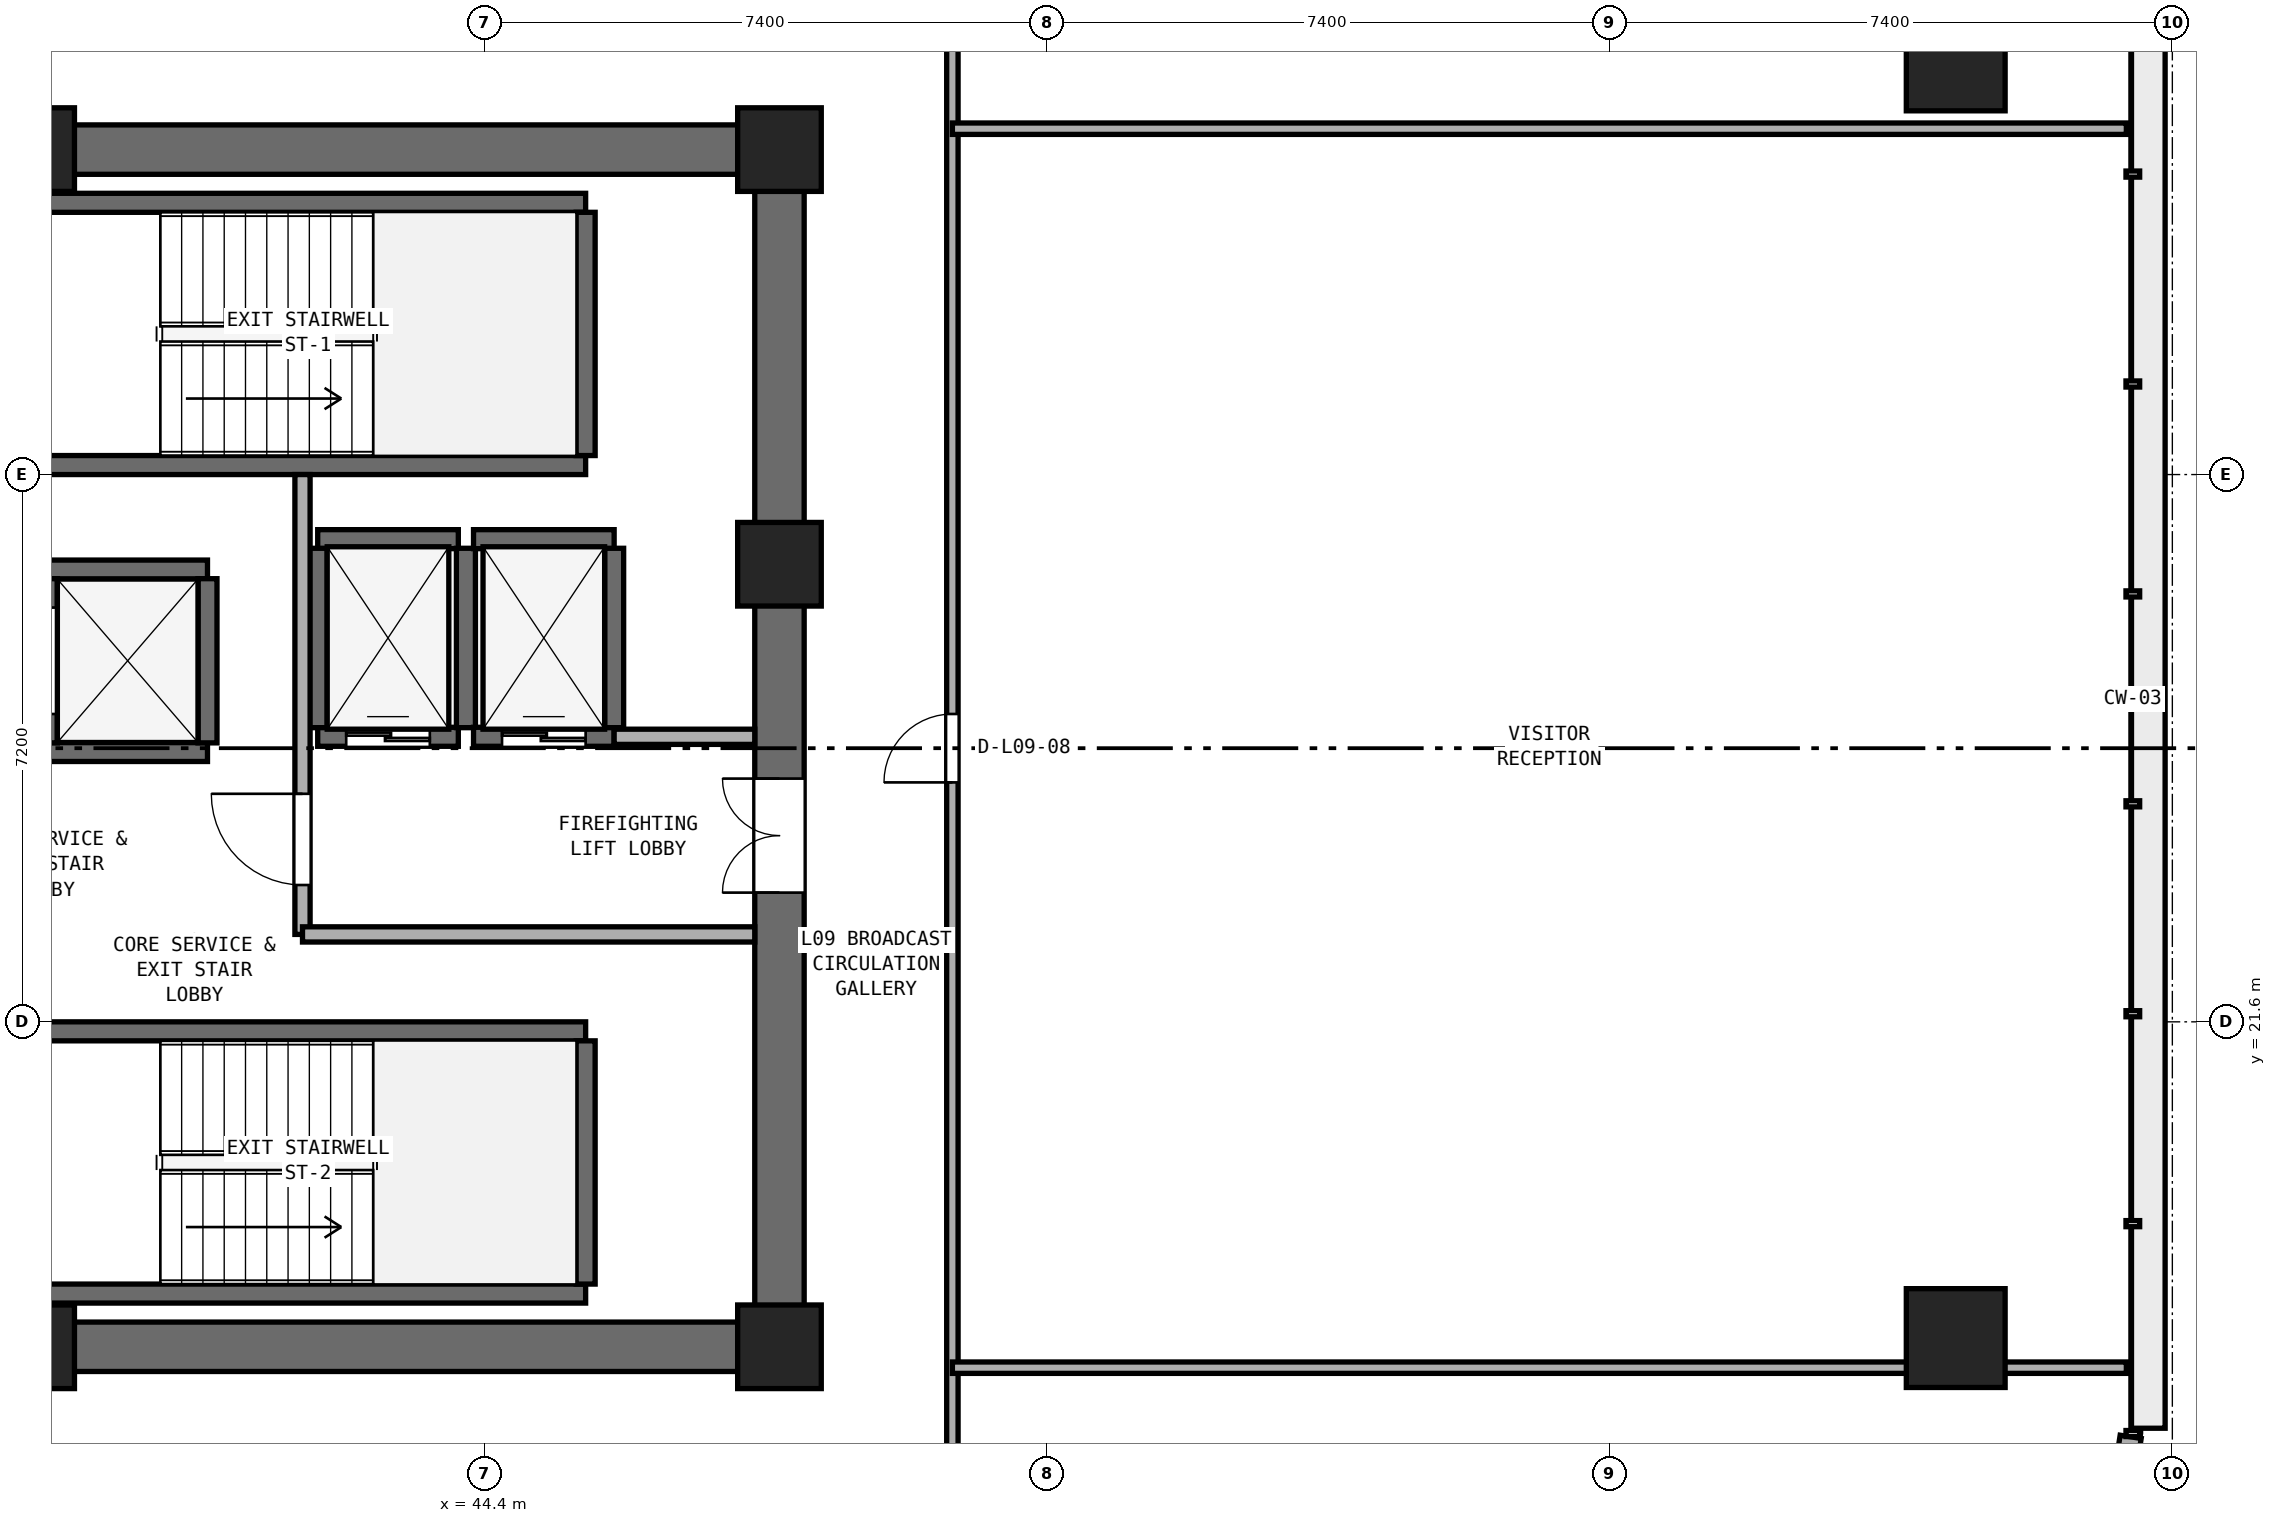
"""IFC4 building model, lengths in metres.
Left out: names, types, materials, properties, quantities, classifications, styles, units other than length and angle.
Written with IfcOpenShell. Run it as: python <this file> out.ifc"""

import sys

from ifc_helpers import new_model, si_unit, direction, frame, frame_2d, origin, origin_2d, place, context, subcontext, project, spatial, rectangle, extrude, element, fill, save


model = new_model("IFC4")
c1 = context("Model", 3, precision=1e-05, world=origin(), true_north=direction((0.0, 1.0)))
c2 = subcontext(c1, "Body", "Model", "MODEL_VIEW")
j1 = project(units=[si_unit("LENGTHUNIT", "METRE"), si_unit("PLANEANGLEUNIT", "RADIAN")], contexts=[c1])
p1 = place(None, origin())
s1 = spatial("IfcSite", under=j1, at=p1, CompositionType="ELEMENT")
p2 = place(p1, origin())
s2 = spatial("IfcBuilding", under=s1, at=p2, CompositionType="ELEMENT")
p3 = place(p2, frame((0.0, 0.0, 40.2)))
s3 = spatial("IfcBuildingStorey", under=s2, at=p3, CompositionType="ELEMENT", Elevation=40.2)
for number, where, z_axis, x_axis in (
    (1, (25.4, 17.325, 0.0), (0.0, 0.0, 1.0), (1.0, 0.0, 0.0)),
    (2, (25.4, 33.075, 0.0), (0.0, 0.0, 1.0), (1.0, 0.0, 0.0)),
):
    element("IfcWall", number, at=place(p3, frame(where, z_axis=z_axis, x_axis=x_axis)), inside=s3, PredefinedType="SHEAR", context=c2, shape_type="SweptSolid", body=[
        extrude(rectangle(XDim=23.2, YDim=0.65, at=frame_2d((11.6, 0.0))), origin(), (0.0, 0.0, 1.0), 3.525),
    ])
p4 = place(p3, frame((48.275, 17.65, 0.0), z_axis=(0.0, 0.0, 1.0), x_axis=(0.0, 1.0, 0.0)))
e3 = element("IfcWall", 3, at=p4, inside=s3, PredefinedType="SHEAR", context=c2, shape_type="SweptSolid", body=[
    extrude(rectangle(XDim=15.1, YDim=0.65, at=frame_2d((7.55, 0.0))), origin(), (0.0, 0.0, 1.0), 3.525),
])
p5 = place(p4, frame((5.65, 0.0, 0.0)))
e4 = element("IfcOpeningElement", 4, at=p5, cuts=e3, PredefinedType="OPENING", context=c2, shape_type="SweptSolid", body=[
    extrude(rectangle(XDim=1.5, YDim=2.15, at=frame_2d((0.75, 1.075))), frame((0.0, 0.335, 0.0), z_axis=(0.0, -1.0, 0.0), x_axis=(1.0, 0.0, 0.0)), (0.0, 0.0, 1.0), 0.67),
])
for number, where, z_axis, x_axis in (
    (5, (38.45, 17.325, 0.0), (0.0, 0.0, 1.0), (1.0, 0.0, 0.0)),
    (6, (48.275, 17.325, 0.0), (0.0, 0.0, 1.0), (1.0, 0.0, 0.0)),
    (7, (48.275, 27.62, 0.0), (0.0, 0.0, 1.0), (1.0, 0.0, 0.0)),
    (8, (48.275, 33.075, 0.0), (0.0, 0.0, 1.0), (1.0, 0.0, 0.0)),
    (9, (38.45, 33.075, 0.0), (0.0, 0.0, 1.0), (1.0, 0.0, 0.0)),
):
    element("IfcColumn", number, at=place(p3, frame(where, z_axis=z_axis, x_axis=x_axis)), inside=s3, PredefinedType="PILASTER", context=c2, shape_type="SweptSolid", body=[
        extrude(rectangle(XDim=1.1, YDim=1.1, at=origin_2d()), origin(), (0.0, 0.0, 1.0), 3.8),
    ])
for number, where, z_axis, x_axis in (
    (10, (63.75, 17.44, 0.0), (0.0, 0.0, 1.0), (1.0, 0.0, 0.0)),
    (11, (63.75, 34.235, 0.0), (0.0, 0.0, 1.0), (1.0, 0.0, 0.0)),
):
    element("IfcColumn", number, at=place(p3, frame(where, z_axis=z_axis, x_axis=x_axis)), inside=s3, PredefinedType="COLUMN", context=c2, shape_type="SweptSolid", body=[
        extrude(rectangle(XDim=1.3, YDim=1.3, at=origin_2d()), origin(), (0.0, 0.0, 1.0), 3.8),
    ])
for number, where, z_axis, x_axis in (
    (12, (38.425, 28.925, 0.0), (0.0, 0.0, 1.0), (1.0, 0.0, 0.0)),
    (13, (38.425, 32.375, 0.0), (0.0, 0.0, 1.0), (1.0, 0.0, 0.0)),
):
    element("IfcWall", number, at=place(p3, frame(where, z_axis=z_axis, x_axis=x_axis)), inside=s3, PredefinedType="SHEAR", context=c2, shape_type="SweptSolid", body=[
        extrude(rectangle(XDim=7.3, YDim=0.25, at=frame_2d((3.65, 0.0))), origin(), (0.0, 0.0, 1.0), 3.525),
    ])
p6 = place(p3, frame((45.725, 29.05, 0.0), z_axis=(0.0, 0.0, 1.0), x_axis=(0.0, 1.0, 0.0)))
e14 = element("IfcWall", 14, at=p6, inside=s3, PredefinedType="SHEAR", context=c2, shape_type="SweptSolid", body=[
    extrude(rectangle(XDim=3.2, YDim=0.25, at=frame_2d((1.6, 0.0))), origin(), (0.0, 0.0, 1.0), 3.525),
])
for number, where, z_axis, x_axis in (
    (15, (38.425, 18.025, 0.0), (0.0, 0.0, 1.0), (1.0, 0.0, 0.0)),
    (16, (38.425, 21.475, 0.0), (0.0, 0.0, 1.0), (1.0, 0.0, 0.0)),
):
    element("IfcWall", number, at=place(p3, frame(where, z_axis=z_axis, x_axis=x_axis)), inside=s3, PredefinedType="SHEAR", context=c2, shape_type="SweptSolid", body=[
        extrude(rectangle(XDim=7.3, YDim=0.25, at=frame_2d((3.65, 0.0))), origin(), (0.0, 0.0, 1.0), 3.525),
    ])
p7 = place(p3, frame((45.725, 18.15, 0.0), z_axis=(0.0, 0.0, 1.0), x_axis=(0.0, 1.0, 0.0)))
e17 = element("IfcWall", 17, at=p7, inside=s3, PredefinedType="SHEAR", context=c2, shape_type="SweptSolid", body=[
    extrude(rectangle(XDim=3.2, YDim=0.25, at=frame_2d((1.6, 0.0))), origin(), (0.0, 0.0, 1.0), 3.525),
])
p8 = place(p3, frame((42.2, 25.35, 0.0), z_axis=(0.0, 0.0, 1.0), x_axis=(1.0, 0.0, 0.0)))
e18 = element("IfcWall", 18, at=p8, inside=s3, PredefinedType="SHEAR", context=c2, shape_type="SweptSolid", body=[
    extrude(rectangle(XDim=1.85, YDim=0.25, at=frame_2d((0.925, 0.0))), origin(), (0.0, 0.0, 1.0), 3.525),
])
p9 = place(p8, frame((0.375, 0.0, 0.0)))
e19 = element("IfcOpeningElement", 19, at=p9, cuts=e18, PredefinedType="OPENING", context=c2, shape_type="SweptSolid", body=[
    extrude(rectangle(XDim=1.1, YDim=2.15, at=frame_2d((0.55, 1.075))), frame((0.0, 0.135, 0.0), z_axis=(0.0, -1.0, 0.0), x_axis=(1.0, 0.0, 0.0)), (0.0, 0.0, 1.0), 0.27),
])
p10 = place(p3, frame((42.2, 27.95, 0.0), z_axis=(0.0, 0.0, 1.0), x_axis=(1.0, 0.0, 0.0)))
e20 = element("IfcWall", 20, at=p10, inside=s3, PredefinedType="SHEAR", context=c2, shape_type="SweptSolid", body=[
    extrude(rectangle(XDim=1.85, YDim=0.25, at=frame_2d((0.925, 0.0))), origin(), (0.0, 0.0, 1.0), 3.525),
])
for number, where, z_axis, x_axis in (
    (21, (42.2, 25.47, 0.0), (0.0, 0.0, 1.0), (0.0, 1.0, 0.0)),
    (22, (44.15, 25.47, 0.0), (0.0, 0.0, 1.0), (0.0, 1.0, 0.0)),
):
    element("IfcWall", number, at=place(p3, frame(where, z_axis=z_axis, x_axis=x_axis)), inside=s3, PredefinedType="SHEAR", context=c2, shape_type="SweptSolid", body=[
        extrude(rectangle(XDim=2.36, YDim=0.25, at=frame_2d((1.18, 0.0))), origin(), (0.0, 0.0, 1.0), 3.525),
    ])
p11 = place(p3, frame((44.25, 25.35, 0.0), z_axis=(0.0, 0.0, 1.0), x_axis=(1.0, 0.0, 0.0)))
e23 = element("IfcWall", 23, at=p11, inside=s3, PredefinedType="SHEAR", context=c2, shape_type="SweptSolid", body=[
    extrude(rectangle(XDim=1.85, YDim=0.25, at=frame_2d((0.925, 0.0))), origin(), (0.0, 0.0, 1.0), 3.525),
])
p12 = place(p11, frame((0.375, 0.0, 0.0)))
e24 = element("IfcOpeningElement", 24, at=p12, cuts=e23, PredefinedType="OPENING", context=c2, shape_type="SweptSolid", body=[
    extrude(rectangle(XDim=1.1, YDim=2.15, at=frame_2d((0.55, 1.075))), frame((0.0, 0.135, 0.0), z_axis=(0.0, -1.0, 0.0), x_axis=(1.0, 0.0, 0.0)), (0.0, 0.0, 1.0), 0.27),
])
p13 = place(p3, frame((44.25, 27.95, 0.0), z_axis=(0.0, 0.0, 1.0), x_axis=(1.0, 0.0, 0.0)))
e25 = element("IfcWall", 25, at=p13, inside=s3, PredefinedType="SHEAR", context=c2, shape_type="SweptSolid", body=[
    extrude(rectangle(XDim=1.85, YDim=0.25, at=frame_2d((0.925, 0.0))), origin(), (0.0, 0.0, 1.0), 3.525),
])
p14 = place(p3, frame((46.1, 25.47, 0.0), z_axis=(0.0, 0.0, 1.0), x_axis=(0.0, 1.0, 0.0)))
e26 = element("IfcWall", 26, at=p14, inside=s3, PredefinedType="SHEAR", context=c2, shape_type="SweptSolid", body=[
    extrude(rectangle(XDim=2.36, YDim=0.25, at=frame_2d((1.18, 0.0))), origin(), (0.0, 0.0, 1.0), 3.525),
])
for number, where, z_axis, x_axis in (
    (27, (38.65, 25.15, 0.0), (0.0, 0.0, 1.0), (1.0, 0.0, 0.0)),
    (28, (38.65, 27.55, 0.0), (0.0, 0.0, 1.0), (1.0, 0.0, 0.0)),
):
    element("IfcWall", number, at=place(p3, frame(where, z_axis=z_axis, x_axis=x_axis)), inside=s3, PredefinedType="SHEAR", context=c2, shape_type="SweptSolid", body=[
        extrude(rectangle(XDim=2.1, YDim=0.25, at=frame_2d((1.05, 0.0))), origin(), (0.0, 0.0, 1.0), 3.525),
    ])
p15 = place(p3, frame((38.65, 25.27, 0.0), z_axis=(0.0, 0.0, 1.0), x_axis=(0.0, 1.0, 0.0)))
e29 = element("IfcWall", 29, at=p15, inside=s3, PredefinedType="SHEAR", context=c2, shape_type="SweptSolid", body=[
    extrude(rectangle(XDim=2.16, YDim=0.25, at=frame_2d((1.08, 0.0))), origin(), (0.0, 0.0, 1.0), 3.525),
])
p16 = place(p15, frame((0.38, 0.0, 0.0)))
e30 = element("IfcOpeningElement", 30, at=p16, cuts=e29, PredefinedType="OPENING", context=c2, shape_type="SweptSolid", body=[
    extrude(rectangle(XDim=1.4, YDim=2.2, at=frame_2d((0.7, 1.1))), frame((0.0, 0.135, 0.0), z_axis=(0.0, -1.0, 0.0), x_axis=(1.0, 0.0, 0.0)), (0.0, 0.0, 1.0), 0.27),
])
p17 = place(p3, frame((40.75, 25.27, 0.0), z_axis=(0.0, 0.0, 1.0), x_axis=(0.0, 1.0, 0.0)))
e31 = element("IfcWall", 31, at=p17, inside=s3, PredefinedType="SHEAR", context=c2, shape_type="SweptSolid", body=[
    extrude(rectangle(XDim=2.16, YDim=0.25, at=frame_2d((1.08, 0.0))), origin(), (0.0, 0.0, 1.0), 3.525),
])
p18 = place(p3, frame((42.0, 22.75, 0.0), z_axis=(0.0, 0.0, 1.0), x_axis=(0.0, 1.0, 0.0)))
e32 = element("IfcWall", 32, at=p18, inside=s3, PredefinedType="SOLIDWALL", context=c2, shape_type="SweptSolid", body=[
    extrude(rectangle(XDim=6.05, YDim=0.2, at=frame_2d((3.025, 0.0))), origin(), (0.0, 0.0, 1.0), 3.525),
])
p19 = place(p18, frame((0.65, 0.0, 0.0)))
e33 = element("IfcOpeningElement", 33, at=p19, cuts=e32, PredefinedType="OPENING", context=c2, shape_type="SweptSolid", body=[
    extrude(rectangle(XDim=1.2, YDim=2.15, at=frame_2d((0.6, 1.075))), frame((0.0, 0.11, 0.0), z_axis=(0.0, -1.0, 0.0), x_axis=(1.0, 0.0, 0.0)), (0.0, 0.0, 1.0), 0.22),
])
p20 = place(p3, frame((42.0, 22.75, 0.0), z_axis=(0.0, 0.0, 1.0), x_axis=(1.0, 0.0, 0.0)))
e34 = element("IfcWall", 34, at=p20, inside=s3, PredefinedType="SOLIDWALL", context=c2, shape_type="SweptSolid", body=[
    extrude(rectangle(XDim=5.95, YDim=0.2, at=frame_2d((2.975, 0.0))), origin(), (0.0, 0.0, 1.0), 3.525),
])
p21 = place(p3, frame((46.1, 25.35, 0.0), z_axis=(0.0, 0.0, 1.0), x_axis=(1.0, 0.0, 0.0)))
e35 = element("IfcWall", 35, at=p21, inside=s3, PredefinedType="SOLIDWALL", context=c2, shape_type="SweptSolid", body=[
    extrude(rectangle(XDim=1.85, YDim=0.2, at=frame_2d((0.925, 0.0))), origin(), (0.0, 0.0, 1.0), 3.525),
])
p22 = place(p3, frame((50.55, 15.05, 0.0), z_axis=(0.0, 0.0, 1.0), x_axis=(0.0, 1.0, 0.0)))
e36 = element("IfcWall", 36, at=p22, inside=s3, PredefinedType="PARTITIONING", context=c2, shape_type="SweptSolid", body=[
    extrude(rectangle(XDim=20.3, YDim=0.15, at=frame_2d((10.15, 0.0))), origin(), (0.0, 0.0, 1.0), 3.525),
])
p23 = place(p22, frame((9.7, 0.0, 0.0)))
e37 = element("IfcOpeningElement", 37, at=p23, cuts=e36, PredefinedType="OPENING", context=c2, shape_type="SweptSolid", body=[
    extrude(rectangle(XDim=0.9, YDim=2.1, at=frame_2d((0.45, 1.05))), frame((0.0, 0.085, 0.0), z_axis=(0.0, -1.0, 0.0), x_axis=(1.0, 0.0, 0.0)), (0.0, 0.0, 1.0), 0.17),
])
p24 = place(p3, frame((50.55, 17.05, 0.0), z_axis=(0.0, 0.0, 1.0), x_axis=(1.0, 0.0, 0.0)))
e38 = element("IfcWall", 38, at=p24, inside=s3, PredefinedType="PARTITIONING", context=c2, shape_type="SweptSolid", body=[
    extrude(rectangle(XDim=15.445, YDim=0.15, at=frame_2d((7.723, 0.0))), origin(), (0.0, 0.0, 1.0), 3.525),
])
p25 = place(p3, frame((50.55, 33.35, 0.0), z_axis=(0.0, 0.0, 1.0), x_axis=(1.0, 0.0, 0.0)))
e39 = element("IfcWall", 39, at=p25, inside=s3, PredefinedType="PARTITIONING", context=c2, shape_type="SweptSolid", body=[
    extrude(rectangle(XDim=15.445, YDim=0.15, at=frame_2d((7.723, 0.0))), origin(), (0.0, 0.0, 1.0), 2.908),
])
p26 = place(p3, frame((65.867, 14.943, 0.0), z_axis=(0.0, 0.0, 1.0), x_axis=(0.152102600021, 0.988364709541, 0.0)))
e40 = element("IfcWall", 40, at=p26, inside=s3, PredefinedType="STANDARD", context=c2, shape_type="SweptSolid", body=[
    extrude(rectangle(XDim=1.212, YDim=0.28, at=frame_2d((0.606, 0.0))), origin(), (0.0, 0.0, 1.0), 3.525),
])
p27 = place(p9, origin())
e41 = element("IfcDoor", 41, at=p27, inside=s3, OperationType="DOUBLE_DOOR_SLIDING", PredefinedType="DOOR", context=c2, shape_type="SweptSolid", body=[
    extrude(rectangle(XDim=1.1, YDim=2.15, at=frame_2d((0.55, 1.075))), frame((0.0, 0.025, 0.0), z_axis=(0.0, -1.0, 0.0), x_axis=(1.0, 0.0, 0.0)), (0.0, 0.0, 1.0), 0.05),
])
fill(e19, e41)
p28 = place(p12, origin())
e42 = element("IfcDoor", 42, at=p28, inside=s3, OperationType="DOUBLE_DOOR_SLIDING", PredefinedType="DOOR", context=c2, shape_type="SweptSolid", body=[
    extrude(rectangle(XDim=1.1, YDim=2.15, at=frame_2d((0.55, 1.075))), frame((0.0, 0.025, 0.0), z_axis=(0.0, -1.0, 0.0), x_axis=(1.0, 0.0, 0.0)), (0.0, 0.0, 1.0), 0.05),
])
fill(e24, e42)
p29 = place(p19, origin())
e43 = element("IfcDoor", 43, at=p29, inside=s3, OperationType="SINGLE_SWING_RIGHT", PredefinedType="DOOR", context=c2, shape_type="SweptSolid", body=[
    extrude(rectangle(XDim=1.2, YDim=2.15, at=frame_2d((0.6, 1.075))), frame((0.0, 0.025, 0.0), z_axis=(0.0, -1.0, 0.0), x_axis=(1.0, 0.0, 0.0)), (0.0, 0.0, 1.0), 0.05),
])
fill(e33, e43)
p30 = place(p5, origin())
e44 = element("IfcDoor", 44, at=p30, inside=s3, OperationType="DOUBLE_DOOR_SINGLE_SWING", PredefinedType="DOOR", context=c2, shape_type="SweptSolid", body=[
    extrude(rectangle(XDim=1.5, YDim=2.15, at=frame_2d((0.75, 1.075))), frame((0.0, 0.025, 0.0), z_axis=(0.0, -1.0, 0.0), x_axis=(1.0, 0.0, 0.0)), (0.0, 0.0, 1.0), 0.05),
])
fill(e4, e44)
p31 = place(p23, origin())
e45 = element("IfcDoor", 45, at=p31, inside=s3, OperationType="SINGLE_SWING_LEFT", PredefinedType="DOOR", context=c2, shape_type="SweptSolid", body=[
    extrude(rectangle(XDim=0.9, YDim=2.1, at=frame_2d((0.45, 1.05))), frame((0.0, 0.025, 0.0), z_axis=(0.0, -1.0, 0.0), x_axis=(1.0, 0.0, 0.0)), (0.0, 0.0, 1.0), 0.05),
])
fill(e37, e45)
save(model, sys.argv[1])
